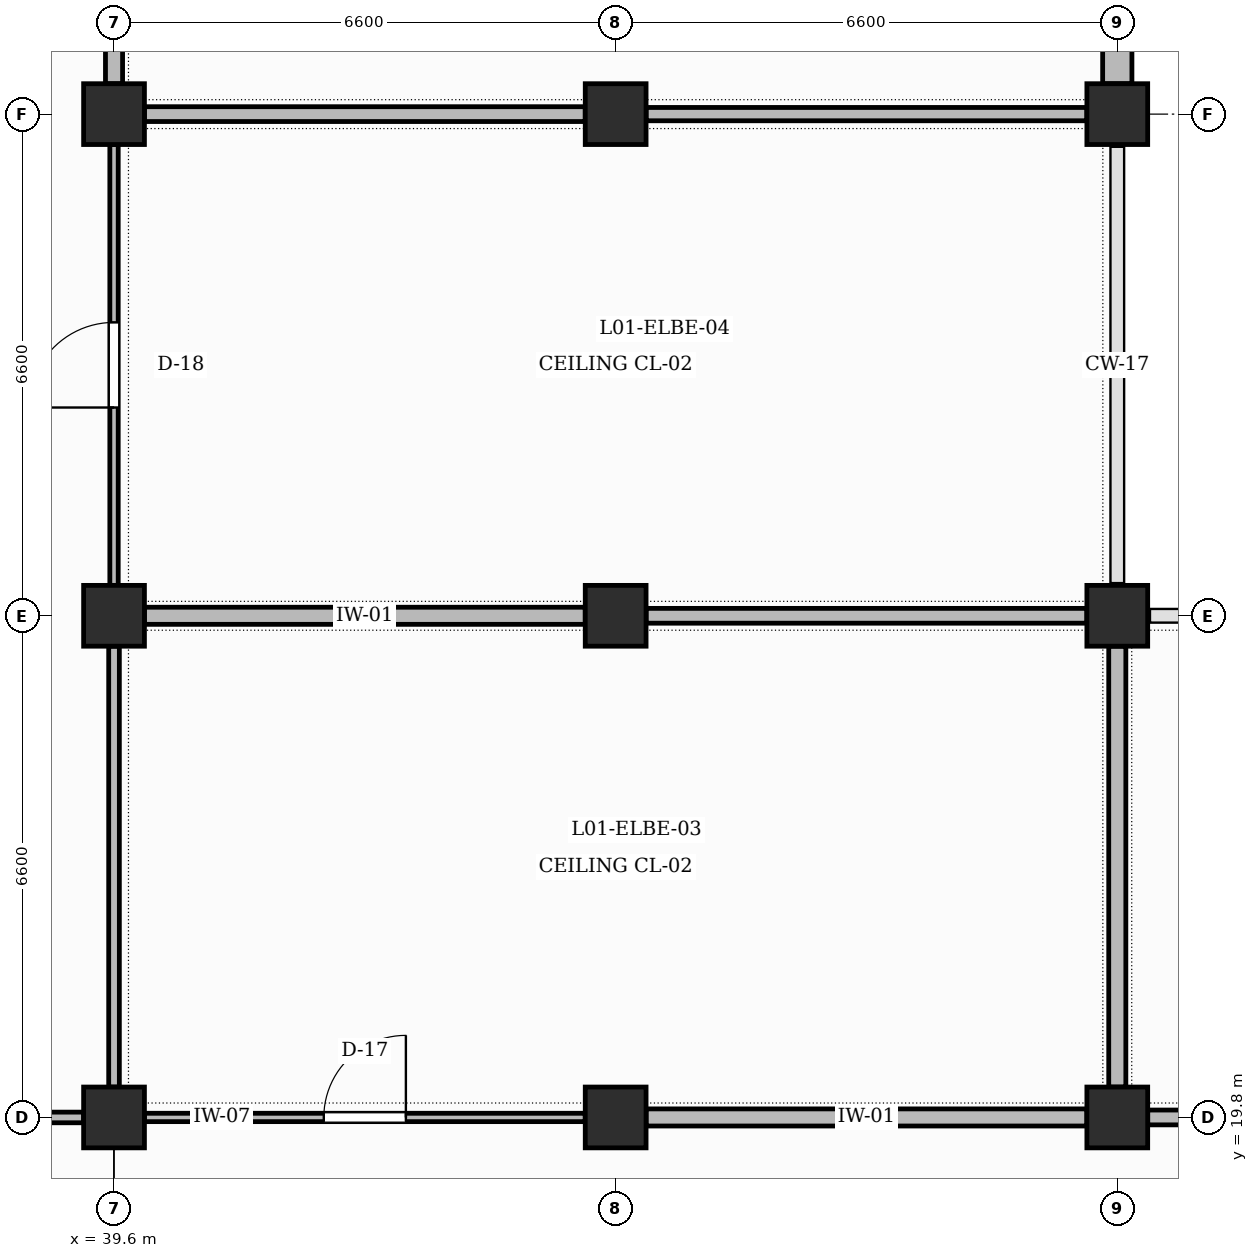
"""IFC4 building model, lengths in metres.
Left out: names, types, materials, properties, quantities, classifications, styles, units other than length and angle.
Written with IfcOpenShell. Run it as: python <this file> out.ifc"""

import sys

from ifc_helpers import new_model, si_unit, direction, frame, frame_2d, origin, origin_2d, place, context, subcontext, project, spatial, rectangle, extrude, element, fill, save


model = new_model("IFC4")
c1 = context("Model", 3, precision=1e-05, world=origin(), true_north=direction((0.0, 1.0)))
c2 = subcontext(c1, "Body", "Model", "MODEL_VIEW")
j1 = project(units=[si_unit("LENGTHUNIT", "METRE"), si_unit("PLANEANGLEUNIT", "RADIAN")], contexts=[c1])
p1 = place(None, origin())
s1 = spatial("IfcSite", under=j1, at=p1, CompositionType="ELEMENT")
p2 = place(p1, origin())
s2 = spatial("IfcBuilding", under=s1, at=p2, CompositionType="ELEMENT")
p3 = place(p2, frame((0.0, 0.0, 5.4)))
s3 = spatial("IfcBuildingStorey", under=s2, at=p3, CompositionType="ELEMENT", Elevation=5.4)
for number, where, z_axis, x_axis in (
    (1, (39.6, 19.8, 0.0), (0.0, 0.0, 1.0), (1.0, 0.0, 0.0)),
    (2, (39.6, 26.4, 0.0), (0.0, 0.0, 1.0), (1.0, 0.0, 0.0)),
    (3, (39.6, 33.0, 0.0), (0.0, 0.0, 1.0), (1.0, 0.0, 0.0)),
    (4, (46.2, 19.8, 0.0), (0.0, 0.0, 1.0), (1.0, 0.0, 0.0)),
    (5, (46.2, 26.4, 0.0), (0.0, 0.0, 1.0), (1.0, 0.0, 0.0)),
    (6, (46.2, 33.0, 0.0), (0.0, 0.0, 1.0), (1.0, 0.0, 0.0)),
    (7, (52.8, 19.8, 0.0), (0.0, 0.0, 1.0), (1.0, 0.0, 0.0)),
    (8, (52.8, 26.4, 0.0), (0.0, 0.0, 1.0), (1.0, 0.0, 0.0)),
    (9, (52.8, 33.0, 0.0), (0.0, 0.0, 1.0), (1.0, 0.0, 0.0)),
):
    element("IfcColumn", number, at=place(p3, frame(where, z_axis=z_axis, x_axis=x_axis)), inside=s3, PredefinedType="COLUMN", context=c2, shape_type="SweptSolid", body=[
        extrude(rectangle(XDim=0.8, YDim=0.8, at=origin_2d()), origin(), (0.0, 0.0, 1.0), 4.8),
    ])
p4 = place(p3, frame((52.8, 33.4, 0.0), z_axis=(0.0, 0.0, 1.0), x_axis=(0.0, 1.0, 0.0)))
e10 = element("IfcWall", 10, at=p4, inside=s3, PredefinedType="SOLIDWALL", context=c2, shape_type="SweptSolid", body=[
    extrude(rectangle(XDim=5.8, YDim=0.385, at=frame_2d((2.9, 0.0))), origin(), (0.0, 0.0, 1.0), 3.85),
])
p5 = place(p4, frame((0.8, 0.0, 0.95)))
e11 = element("IfcOpeningElement", 11, at=p5, cuts=e10, PredefinedType="OPENING", context=c2, shape_type="SweptSolid", body=[
    extrude(rectangle(XDim=1.02, YDim=1.3, at=frame_2d((0.51, 0.65))), frame((0.0, 0.202, 0.0), z_axis=(0.0, -1.0, 0.0), x_axis=(1.0, 0.0, 0.0)), (0.0, 0.0, 1.0), 0.405),
])
p6 = place(p4, frame((3.98, 0.0, 0.95)))
e12 = element("IfcOpeningElement", 12, at=p6, cuts=e10, PredefinedType="OPENING", context=c2, shape_type="SweptSolid", body=[
    extrude(rectangle(XDim=1.02, YDim=1.3, at=frame_2d((0.51, 0.65))), frame((0.0, 0.202, 0.0), z_axis=(0.0, -1.0, 0.0), x_axis=(1.0, 0.0, 0.0)), (0.0, 0.0, 1.0), 0.405),
])
p7 = place(p3, frame((33.425, 19.8, 0.0), z_axis=(0.0, 0.0, 1.0), x_axis=(1.0, 0.0, 0.0)))
e13 = element("IfcWall", 13, at=p7, inside=s3, PredefinedType="PARTITIONING", context=c2, shape_type="SweptSolid", body=[
    extrude(rectangle(XDim=5.775, YDim=0.14, at=frame_2d((2.887, 0.0))), origin(), (0.0, 0.0, 1.0), 3.6),
])
p8 = place(p7, frame((2.025, 0.0, 0.0)))
e14 = element("IfcOpeningElement", 14, at=p8, cuts=e13, PredefinedType="OPENING", context=c2, shape_type="SweptSolid", body=[
    extrude(rectangle(XDim=1.7, YDim=2.25, at=frame_2d((0.85, 1.125))), frame((0.0, 0.08, 0.0), z_axis=(0.0, -1.0, 0.0), x_axis=(1.0, 0.0, 0.0)), (0.0, 0.0, 1.0), 0.16),
])
p9 = place(p3, frame((39.6, 20.2, 0.0), z_axis=(0.0, 0.0, 1.0), x_axis=(0.0, 1.0, 0.0)))
e15 = element("IfcWall", 15, at=p9, inside=s3, PredefinedType="PARTITIONING", context=c2, shape_type="SweptSolid", body=[
    extrude(rectangle(XDim=5.8, YDim=0.14, at=frame_2d((2.9, 0.0))), origin(), (0.0, 0.0, 1.0), 3.7),
])
p10 = place(p3, frame((39.6, 26.8, 0.0), z_axis=(0.0, 0.0, 1.0), x_axis=(0.0, 1.0, 0.0)))
e16 = element("IfcWall", 16, at=p10, inside=s3, PredefinedType="PARTITIONING", context=c2, shape_type="SweptSolid", body=[
    extrude(rectangle(XDim=5.8, YDim=0.11, at=frame_2d((2.9, 0.0))), origin(), (0.0, 0.0, 1.0), 3.7),
])
p11 = place(p10, frame((2.34, 0.0, 0.0)))
e17 = element("IfcOpeningElement", 17, at=p11, cuts=e16, PredefinedType="OPENING", context=c2, shape_type="SweptSolid", body=[
    extrude(rectangle(XDim=1.12, YDim=2.2, at=frame_2d((0.56, 1.1))), frame((0.0, 0.065, 0.0), z_axis=(0.0, -1.0, 0.0), x_axis=(1.0, 0.0, 0.0)), (0.0, 0.0, 1.0), 0.13),
])
p12 = place(p3, frame((39.6, 33.4, 0.0), z_axis=(0.0, 0.0, 1.0), x_axis=(0.0, 1.0, 0.0)))
e18 = element("IfcWall", 18, at=p12, inside=s3, PredefinedType="PARTITIONING", context=c2, shape_type="SweptSolid", body=[
    extrude(rectangle(XDim=5.8, YDim=0.225, at=frame_2d((2.9, 0.0))), origin(), (0.0, 0.0, 1.0), 3.7),
])
p13 = place(p12, frame((2.31, 0.0, 0.0)))
e19 = element("IfcOpeningElement", 19, at=p13, cuts=e18, PredefinedType="OPENING", context=c2, shape_type="SweptSolid", body=[
    extrude(rectangle(XDim=1.18, YDim=2.2, at=frame_2d((0.59, 1.1))), frame((0.0, 0.123, 0.0), z_axis=(0.0, -1.0, 0.0), x_axis=(1.0, 0.0, 0.0)), (0.0, 0.0, 1.0), 0.245),
])
p14 = place(p3, frame((40.0, 19.8, 0.0), z_axis=(0.0, 0.0, 1.0), x_axis=(1.0, 0.0, 0.0)))
e20 = element("IfcWall", 20, at=p14, inside=s3, PredefinedType="PARTITIONING", context=c2, shape_type="SweptSolid", body=[
    extrude(rectangle(XDim=5.8, YDim=0.11, at=frame_2d((2.9, 0.0))), origin(), (0.0, 0.0, 1.0), 3.7),
])
p15 = place(p14, frame((2.36, 0.0, 0.0)))
e21 = element("IfcOpeningElement", 21, at=p15, cuts=e20, PredefinedType="OPENING", context=c2, shape_type="SweptSolid", body=[
    extrude(rectangle(XDim=1.08, YDim=2.15, at=frame_2d((0.54, 1.075))), frame((0.0, 0.065, 0.0), z_axis=(0.0, -1.0, 0.0), x_axis=(1.0, 0.0, 0.0)), (0.0, 0.0, 1.0), 0.13),
])
p16 = place(p3, frame((40.0, 26.4, 0.0), z_axis=(0.0, 0.0, 1.0), x_axis=(1.0, 0.0, 0.0)))
e22 = element("IfcWall", 22, at=p16, inside=s3, PredefinedType="PARTITIONING", context=c2, shape_type="SweptSolid", body=[
    extrude(rectangle(XDim=5.8, YDim=0.225, at=frame_2d((2.9, 0.0))), origin(), (0.0, 0.0, 1.0), 3.6),
])
p17 = place(p3, frame((40.0, 33.0, 0.0), z_axis=(0.0, 0.0, 1.0), x_axis=(1.0, 0.0, 0.0)))
e23 = element("IfcWall", 23, at=p17, inside=s3, PredefinedType="PARTITIONING", context=c2, shape_type="SweptSolid", body=[
    extrude(rectangle(XDim=5.8, YDim=0.195, at=frame_2d((2.9, 0.0))), origin(), (0.0, 0.0, 1.0), 3.7),
])
p18 = place(p3, frame((46.6, 19.8, 0.0), z_axis=(0.0, 0.0, 1.0), x_axis=(1.0, 0.0, 0.0)))
e24 = element("IfcWall", 24, at=p18, inside=s3, PredefinedType="PARTITIONING", context=c2, shape_type="SweptSolid", body=[
    extrude(rectangle(XDim=5.8, YDim=0.225, at=frame_2d((2.9, 0.0))), origin(), (0.0, 0.0, 1.0), 3.6),
])
p19 = place(p3, frame((52.8, 20.2, 0.0), z_axis=(0.0, 0.0, 1.0), x_axis=(0.0, 1.0, 0.0)))
e25 = element("IfcWall", 25, at=p19, inside=s3, PredefinedType="PARTITIONING", context=c2, shape_type="SweptSolid", body=[
    extrude(rectangle(XDim=5.8, YDim=0.225, at=frame_2d((2.9, 0.0))), origin(), (0.0, 0.0, 1.0), 3.7),
])
p20 = place(p3, frame((46.6, 26.4, 0.0), z_axis=(0.0, 0.0, 1.0), x_axis=(1.0, 0.0, 0.0)))
e26 = element("IfcWall", 26, at=p20, inside=s3, PredefinedType="PARTITIONING", context=c2, shape_type="SweptSolid", body=[
    extrude(rectangle(XDim=5.8, YDim=0.195, at=frame_2d((2.9, 0.0))), origin(), (0.0, 0.0, 1.0), 3.7),
])
p21 = place(p3, frame((46.6, 33.0, 0.0), z_axis=(0.0, 0.0, 1.0), x_axis=(1.0, 0.0, 0.0)))
e27 = element("IfcWall", 27, at=p21, inside=s3, PredefinedType="PARTITIONING", context=c2, shape_type="SweptSolid", body=[
    extrude(rectangle(XDim=5.8, YDim=0.175, at=frame_2d((2.9, 0.0))), origin(), (0.0, 0.0, 1.0), 3.6),
])
p22 = place(p3, frame((53.2, 19.8, 0.0), z_axis=(0.0, 0.0, 1.0), x_axis=(1.0, 0.0, 0.0)))
e28 = element("IfcWall", 28, at=p22, inside=s3, PredefinedType="PARTITIONING", context=c2, shape_type="SweptSolid", body=[
    extrude(rectangle(XDim=5.8, YDim=0.195, at=frame_2d((2.9, 0.0))), origin(), (0.0, 0.0, 1.0), 3.7),
])
p23 = place(p22, frame((2.2, 0.0, 0.0)))
e29 = element("IfcOpeningElement", 29, at=p23, cuts=e28, PredefinedType="OPENING", context=c2, shape_type="SweptSolid", body=[
    extrude(rectangle(XDim=1.4, YDim=2.25, at=frame_2d((0.7, 1.125))), frame((0.0, 0.107, 0.0), z_axis=(0.0, -1.0, 0.0), x_axis=(1.0, 0.0, 0.0)), (0.0, 0.0, 1.0), 0.215),
])
p24 = place(p15, origin())
e30 = element("IfcDoor", 30, at=p24, inside=s3, OperationType="SINGLE_SWING_RIGHT", PredefinedType="DOOR", context=c2, shape_type="SweptSolid", body=[
    extrude(rectangle(XDim=1.08, YDim=2.15, at=frame_2d((0.54, 1.075))), frame((0.0, 0.025, 0.0), z_axis=(0.0, -1.0, 0.0), x_axis=(1.0, 0.0, 0.0)), (0.0, 0.0, 1.0), 0.05),
])
fill(e21, e30)
p25 = place(p11, origin())
e31 = element("IfcDoor", 31, at=p25, inside=s3, OperationType="SINGLE_SWING_LEFT", PredefinedType="DOOR", context=c2, shape_type="SweptSolid", body=[
    extrude(rectangle(XDim=1.12, YDim=2.2, at=frame_2d((0.56, 1.1))), frame((0.0, 0.025, 0.0), z_axis=(0.0, -1.0, 0.0), x_axis=(1.0, 0.0, 0.0)), (0.0, 0.0, 1.0), 0.05),
])
fill(e17, e31)
save(model, sys.argv[1])
